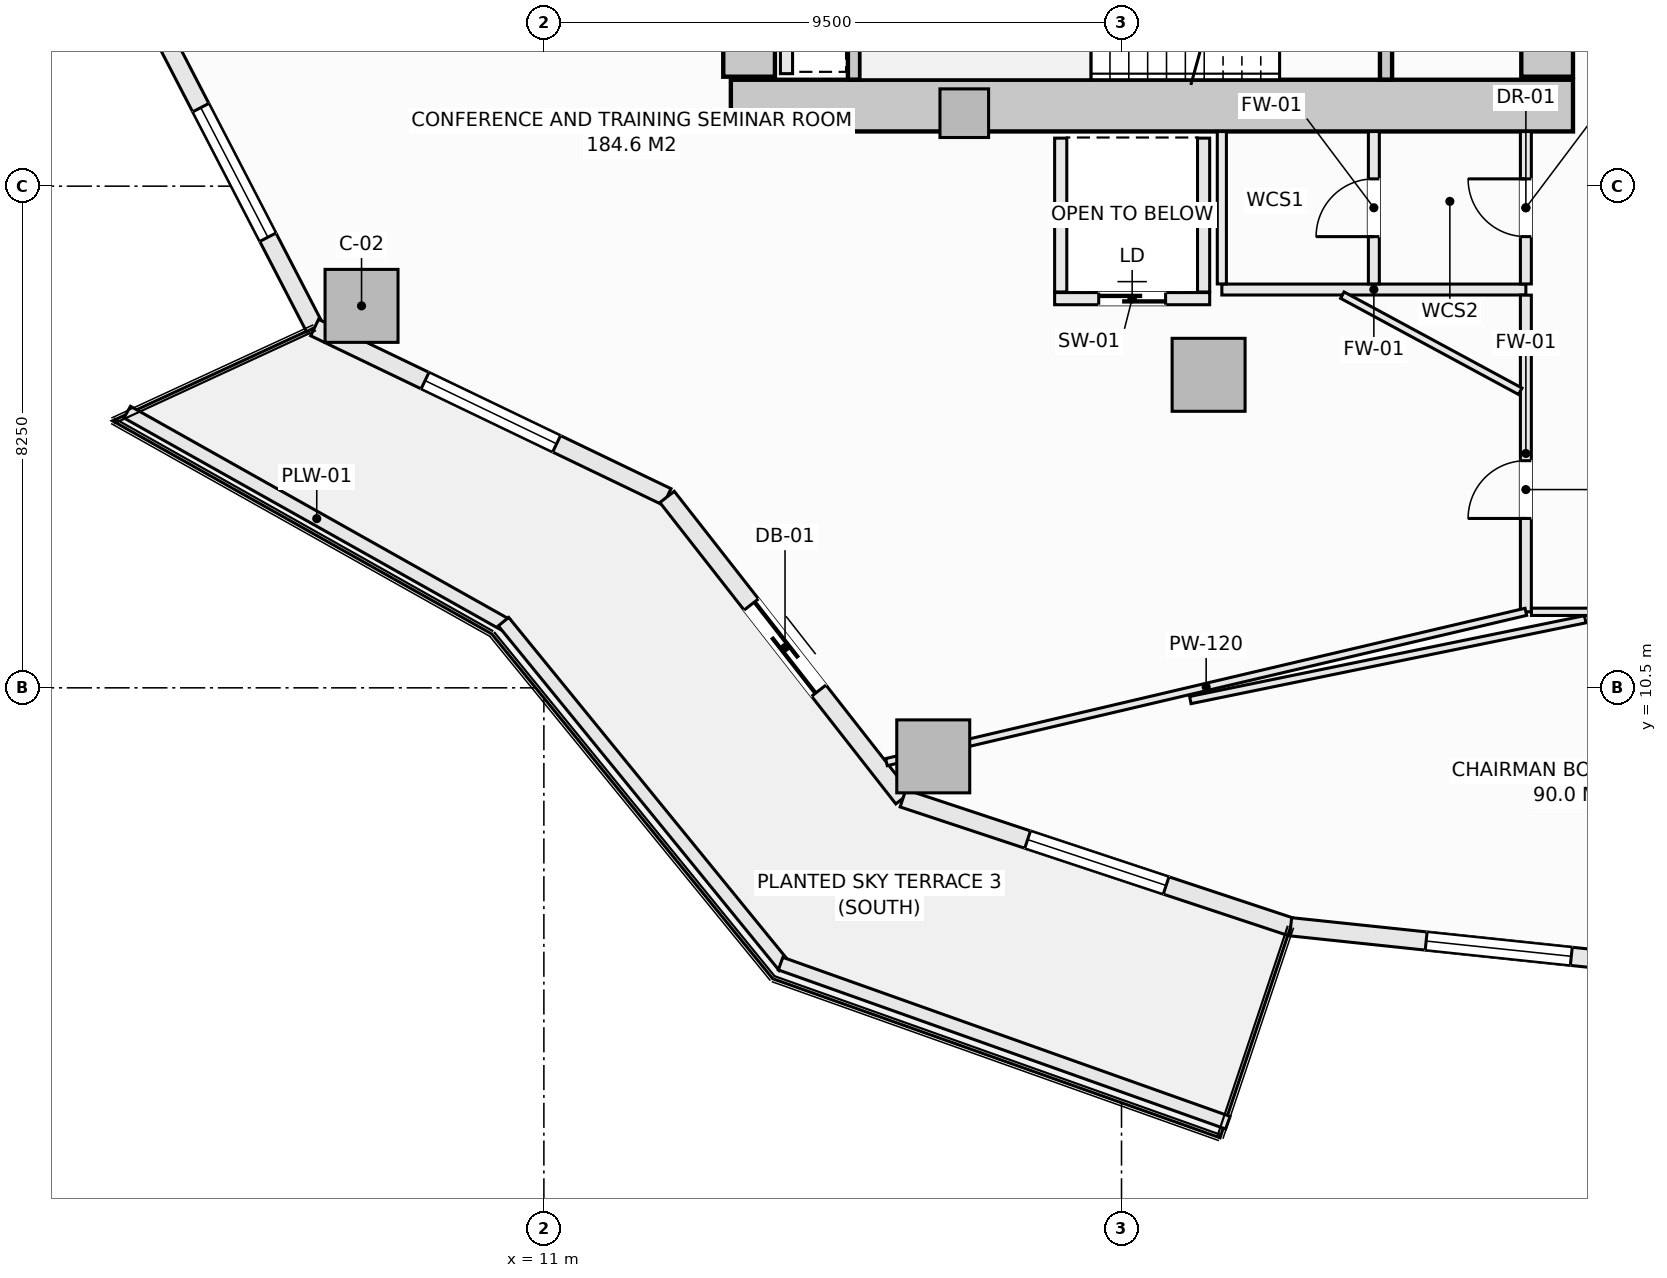
"""IFC4 building model, lengths in metres.
Left out: names, types, materials, properties, quantities, classifications, styles, units other than length and angle.
Written with IfcOpenShell. Run it as: python <this file> out.ifc"""

import sys

from ifc_helpers import new_model, si_unit, direction, frame, frame_2d, origin, origin_2d, place, context, subcontext, project, spatial, rectangle, extrude, element, fill, save


model = new_model("IFC4")
c1 = context("Model", 3, precision=1e-05, world=origin(), true_north=direction((0.0, 1.0)))
c2 = subcontext(c1, "Body", "Model", "MODEL_VIEW")
j1 = project(units=[si_unit("LENGTHUNIT", "METRE"), si_unit("PLANEANGLEUNIT", "RADIAN")], contexts=[c1])
p1 = place(None, origin())
s1 = spatial("IfcSite", under=j1, at=p1, CompositionType="ELEMENT")
p2 = place(p1, origin())
s2 = spatial("IfcBuilding", under=s1, at=p2, CompositionType="ELEMENT")
p3 = place(p2, frame((0.0, 0.0, 88.1)))
s3 = spatial("IfcBuildingStorey", under=s2, at=p3, CompositionType="ELEMENT", Elevation=88.1)
p4 = place(p3, frame((14.075, 20.075, -0.28), z_axis=(0.0, 0.0, 1.0), x_axis=(1.0, 0.0, 0.0)))
e1 = element("IfcWall", 1, at=p4, inside=s3, PredefinedType="SHEAR", context=c2, shape_type="SweptSolid", body=[
    extrude(rectangle(XDim=13.85, YDim=0.85, at=frame_2d((6.925, 0.0))), origin(), (0.0, 0.0, 1.0), 3.85),
])
p5 = place(p3, frame((14.375, 20.55, -0.28), z_axis=(0.0, 0.0, 1.0), x_axis=(0.0, 1.0, 0.0)))
e2 = element("IfcWall", 2, at=p5, inside=s3, PredefinedType="SHEAR", context=c2, shape_type="SweptSolid", body=[
    extrude(rectangle(XDim=12.9, YDim=0.85, at=frame_2d((6.45, 0.0))), origin(), (0.0, 0.0, 1.0), 3.85),
])
p6 = place(p3, frame((27.5, 20.55, -0.28), z_axis=(0.0, 0.0, 1.0), x_axis=(0.0, 1.0, 0.0)))
e3 = element("IfcWall", 3, at=p6, inside=s3, PredefinedType="SHEAR", context=c2, shape_type="SweptSolid", body=[
    extrude(rectangle(XDim=1.5, YDim=0.85, at=frame_2d((0.75, 0.0))), origin(), (0.0, 0.0, 1.0), 3.85),
])
for number, where, z_axis, x_axis in (
    (4, (8.001, 16.781, -0.28), (0.0, 0.0, 1.0), (1.0, 0.0, 0.0)),
    (5, (17.404, 9.373, -0.28), (0.0, 0.0, 1.0), (1.0, 0.0, 0.0)),
    (6, (21.932, 15.648, -0.28), (0.0, 0.0, 1.0), (1.0, 0.0, 0.0)),
):
    element("IfcColumn", number, at=place(p3, frame(where, z_axis=z_axis, x_axis=x_axis)), inside=s3, PredefinedType="COLUMN", context=c2, shape_type="SweptSolid", body=[
        extrude(rectangle(XDim=1.2, YDim=1.2, at=origin_2d()), origin(), (0.0, 0.0, 1.0), 3.85),
    ])
p7 = place(p3, frame((17.914, 19.95, -0.28), z_axis=(0.0, 0.0, 1.0), x_axis=(1.0, 0.0, 0.0)))
e7 = element("IfcColumn", 7, at=p7, inside=s3, PredefinedType="PILASTER", context=c2, shape_type="SweptSolid", body=[
    extrude(rectangle(XDim=0.8, YDim=0.8, at=origin_2d()), origin(), (0.0, 0.0, 1.0), 3.85),
])
p8 = place(p3, frame((4.588, 21.526, 0.0), z_axis=(0.0, 0.0, 1.0), x_axis=(0.459800981414, -0.888021991558, 0.0)))
e8 = element("IfcWall", 8, at=p8, inside=s3, PredefinedType="SOLIDWALL", context=c2, shape_type="SweptSolid", body=[
    extrude(rectangle(XDim=5.744, YDim=0.3, at=frame_2d((2.872, 0.0))), origin(), (0.0, 0.0, 1.0), 3.093),
])
p9 = place(p8, frame((1.672, 0.0, 0.85)))
e9 = element("IfcOpeningElement", 9, at=p9, cuts=e8, PredefinedType="OPENING", context=c2, shape_type="SweptSolid", body=[
    extrude(rectangle(XDim=2.4, YDim=1.9, at=frame_2d((1.2, 0.95))), frame((0.0, 0.16, 0.0), z_axis=(0.0, -1.0, 0.0), x_axis=(1.0, 0.0, 0.0)), (0.0, 0.0, 1.0), 0.32),
])
p10 = place(p3, frame((7.229, 16.425, 0.0), z_axis=(0.0, 0.0, 1.0), x_axis=(0.901354747727, -0.433081538224, 0.0)))
e10 = element("IfcWall", 10, at=p10, inside=s3, PredefinedType="SOLIDWALL", context=c2, shape_type="SweptSolid", body=[
    extrude(rectangle(XDim=6.431, YDim=0.3, at=frame_2d((3.215, 0.0))), origin(), (0.0, 0.0, 1.0), 3.093),
])
p11 = place(p10, frame((2.015, 0.0, 0.85)))
e11 = element("IfcOpeningElement", 11, at=p11, cuts=e10, PredefinedType="OPENING", context=c2, shape_type="SweptSolid", body=[
    extrude(rectangle(XDim=2.4, YDim=1.9, at=frame_2d((1.2, 0.95))), frame((0.0, 0.16, 0.0), z_axis=(0.0, -1.0, 0.0), x_axis=(1.0, 0.0, 0.0)), (0.0, 0.0, 1.0), 0.32),
])
p12 = place(p3, frame((13.026, 13.64, 0.0), z_axis=(0.0, 0.0, 1.0), x_axis=(0.616434798832, -0.78740595552, 0.0)))
e12 = element("IfcWall", 12, at=p12, inside=s3, PredefinedType="SOLIDWALL", context=c2, shape_type="SweptSolid", body=[
    extrude(rectangle(XDim=6.294, YDim=0.3, at=frame_2d((3.147, 0.0))), origin(), (0.0, 0.0, 1.0), 3.093),
])
p13 = place(p12, frame((2.247, 0.0, 0.0)))
e13 = element("IfcOpeningElement", 13, at=p13, cuts=e12, PredefinedType="OPENING", context=c2, shape_type="SweptSolid", body=[
    extrude(rectangle(XDim=1.8, YDim=2.25, at=frame_2d((0.9, 1.125))), frame((0.0, 0.16, 0.0), z_axis=(0.0, -1.0, 0.0), x_axis=(1.0, 0.0, 0.0)), (0.0, 0.0, 1.0), 0.32),
])
p14 = place(p3, frame((16.906, 8.684, 0.0), z_axis=(0.0, 0.0, 1.0), x_axis=(0.949245153629, -0.314537181127, 0.0)))
e14 = element("IfcWall", 14, at=p14, inside=s3, PredefinedType="SOLIDWALL", context=c2, shape_type="SweptSolid", body=[
    extrude(rectangle(XDim=6.717, YDim=0.3, at=frame_2d((3.358, 0.0))), origin(), (0.0, 0.0, 1.0), 3.093),
])
p15 = place(p14, frame((2.159, 0.0, 0.85)))
e15 = element("IfcOpeningElement", 15, at=p15, cuts=e14, PredefinedType="OPENING", context=c2, shape_type="SweptSolid", body=[
    extrude(rectangle(XDim=2.4, YDim=1.9, at=frame_2d((1.2, 0.95))), frame((0.0, 0.16, 0.0), z_axis=(0.0, -1.0, 0.0), x_axis=(1.0, 0.0, 0.0)), (0.0, 0.0, 1.0), 0.32),
])
p16 = place(p3, frame((23.282, 6.571, 0.0), z_axis=(0.0, 0.0, 1.0), x_axis=(0.994498840295, -0.104747585419, 0.0)))
e16 = element("IfcWall", 16, at=p16, inside=s3, PredefinedType="SOLIDWALL", context=c2, shape_type="SweptSolid", body=[
    extrude(rectangle(XDim=6.88, YDim=0.3, at=frame_2d((3.44, 0.0))), origin(), (0.0, 0.0, 1.0), 3.093),
])
p17 = place(p16, frame((2.24, 0.0, 0.85)))
e17 = element("IfcOpeningElement", 17, at=p17, cuts=e16, PredefinedType="OPENING", context=c2, shape_type="SweptSolid", body=[
    extrude(rectangle(XDim=2.4, YDim=1.9, at=frame_2d((1.2, 0.95))), frame((0.0, 0.16, 0.0), z_axis=(0.0, -1.0, 0.0), x_axis=(1.0, 0.0, 0.0)), (0.0, 0.0, 1.0), 0.32),
])
p18 = place(p3, frame((4.147, 15.034, 0.0), z_axis=(0.0, 0.0, 1.0), x_axis=(0.871775109335, -0.489906275468, 0.0)))
e18 = element("IfcWall", 18, at=p18, inside=s3, PredefinedType="PARAPET", context=c2, shape_type="SweptSolid", body=[
    extrude(rectangle(XDim=7.152, YDim=0.22, at=frame_2d((3.576, 0.0))), origin(), (0.0, 0.0, 1.0), 0.52),
])
p19 = place(p3, frame((10.336, 11.589, 0.0), z_axis=(0.0, 0.0, 1.0), x_axis=(0.631819273026, -0.775115737315, 0.0)))
e19 = element("IfcWall", 19, at=p19, inside=s3, PredefinedType="PARAPET", context=c2, shape_type="SweptSolid", body=[
    extrude(rectangle(XDim=7.316, YDim=0.22, at=frame_2d((3.658, 0.0))), origin(), (0.0, 0.0, 1.0), 0.52),
])
p20 = place(p3, frame((14.893, 5.965, 0.0), z_axis=(0.0, 0.0, 1.0), x_axis=(0.942203722205, -0.335040513764, 0.0)))
e20 = element("IfcWall", 20, at=p20, inside=s3, PredefinedType="PARAPET", context=c2, shape_type="SweptSolid", body=[
    extrude(rectangle(XDim=7.807, YDim=0.22, at=frame_2d((3.904, 0.0))), origin(), (0.0, 0.0, 1.0), 0.52),
])
p21 = place(p3, frame((24.85, 20.502, -0.28), z_axis=(0.0, 0.0, 1.0), x_axis=(0.0, 1.0, 0.0)))
e21 = element("IfcWall", 21, at=p21, inside=s3, PredefinedType="SHEAR", context=c2, shape_type="SweptSolid", body=[
    extrude(rectangle(XDim=3.038, YDim=0.2, at=frame_2d((1.519, 0.0))), origin(), (0.0, 0.0, 1.0), 3.85),
])
p22 = place(p21, frame((0.969, 0.0, 0.28)))
e22 = element("IfcOpeningElement", 22, at=p22, cuts=e21, PredefinedType="OPENING", context=c2, shape_type="SweptSolid", body=[
    extrude(rectangle(XDim=1.1, YDim=2.15, at=frame_2d((0.55, 1.075))), frame((0.0, 0.11, 0.0), z_axis=(0.0, -1.0, 0.0), x_axis=(1.0, 0.0, 0.0)), (0.0, 0.0, 1.0), 0.22),
])
p23 = place(p3, frame((16.1, 20.502, -0.28), z_axis=(0.0, 0.0, 1.0), x_axis=(0.0, 1.0, 0.0)))
e23 = element("IfcWall", 23, at=p23, inside=s3, PredefinedType="SHEAR", context=c2, shape_type="SweptSolid", body=[
    extrude(rectangle(XDim=3.036, YDim=0.2, at=frame_2d((1.518, 0.0))), origin(), (0.0, 0.0, 1.0), 3.85),
])
p24 = place(p3, frame((19.4, 16.9, 0.0), z_axis=(0.0, 0.0, 1.0), x_axis=(1.0, 0.0, 0.0)))
e24 = element("IfcWall", 24, at=p24, inside=s3, PredefinedType="SOLIDWALL", context=c2, shape_type="SweptSolid", body=[
    extrude(rectangle(XDim=2.55, YDim=0.2, at=frame_2d((1.275, 0.0))), origin(), (0.0, 0.0, 1.0), 3.57),
])
p25 = place(p24, frame((0.725, 0.0, 0.0)))
e25 = element("IfcOpeningElement", 25, at=p25, cuts=e24, PredefinedType="OPENING", context=c2, shape_type="SweptSolid", body=[
    extrude(rectangle(XDim=1.1, YDim=2.2, at=frame_2d((0.55, 1.1))), frame((0.0, 0.11, 0.0), z_axis=(0.0, -1.0, 0.0), x_axis=(1.0, 0.0, 0.0)), (0.0, 0.0, 1.0), 0.22),
])
for number, where, z_axis, x_axis in (
    (26, (19.5, 17.01, 0.0), (0.0, 0.0, 1.0), (0.0, 1.0, 0.0)),
    (27, (21.85, 17.01, 0.0), (0.0, 0.0, 1.0), (0.0, 1.0, 0.0)),
):
    element("IfcWall", number, at=place(p3, frame(where, z_axis=z_axis, x_axis=x_axis)), inside=s3, PredefinedType="SOLIDWALL", context=c2, shape_type="SweptSolid", body=[
        extrude(rectangle(XDim=2.53, YDim=0.2, at=frame_2d((1.265, 0.0))), origin(), (0.0, 0.0, 1.0), 3.57),
    ])
p26 = place(p3, frame((14.99, 20.6, 0.0), z_axis=(0.0, 0.0, 1.0), x_axis=(0.0, 1.0, 0.0)))
e28 = element("IfcWall", 28, at=p26, inside=s3, PredefinedType="SOLIDWALL", context=c2, shape_type="SweptSolid", body=[
    extrude(rectangle(XDim=2.85, YDim=0.2, at=frame_2d((1.425, 0.0))), origin(), (0.0, 0.0, 1.0), 3.57),
])
p27 = place(p3, frame((22.15, 17.05, 0.0), z_axis=(0.0, 0.0, 1.0), x_axis=(1.0, 0.0, 0.0)))
e29 = element("IfcWall", 29, at=p27, inside=s3, PredefinedType="SOLIDWALL", context=c2, shape_type="SweptSolid", body=[
    extrude(rectangle(XDim=5.0, YDim=0.18, at=frame_2d((2.5, 0.0))), origin(), (0.0, 0.0, 1.0), 3.57),
])
p28 = place(p3, frame((22.15, 17.142, 0.0), z_axis=(0.0, 0.0, 1.0), x_axis=(0.0, 1.0, 0.0)))
e30 = element("IfcWall", 30, at=p28, inside=s3, PredefinedType="PARTITIONING", context=c2, shape_type="SweptSolid", body=[
    extrude(rectangle(XDim=2.506, YDim=0.15, at=frame_2d((1.253, 0.0))), origin(), (0.0, 0.0, 1.0), 3.57),
])
p29 = place(p3, frame((24.65, 17.142, 0.0), z_axis=(0.0, 0.0, 1.0), x_axis=(0.0, 1.0, 0.0)))
e31 = element("IfcWall", 31, at=p29, inside=s3, PredefinedType="SOLIDWALL", context=c2, shape_type="SweptSolid", body=[
    extrude(rectangle(XDim=2.506, YDim=0.18, at=frame_2d((1.253, 0.0))), origin(), (0.0, 0.0, 1.0), 3.57),
])
p30 = place(p29, frame((0.778, 0.0, 0.0)))
e32 = element("IfcOpeningElement", 32, at=p30, cuts=e31, PredefinedType="OPENING", context=c2, shape_type="SweptSolid", body=[
    extrude(rectangle(XDim=0.95, YDim=2.1, at=frame_2d((0.475, 1.05))), frame((0.0, 0.1, 0.0), z_axis=(0.0, -1.0, 0.0), x_axis=(1.0, 0.0, 0.0)), (0.0, 0.0, 1.0), 0.2),
])
p31 = place(p3, frame((27.15, 11.75, 0.0), z_axis=(0.0, 0.0, 1.0), x_axis=(0.0, 1.0, 0.0)))
e33 = element("IfcWall", 33, at=p31, inside=s3, PredefinedType="SOLIDWALL", context=c2, shape_type="SweptSolid", body=[
    extrude(rectangle(XDim=5.208, YDim=0.18, at=frame_2d((2.604, 0.0))), origin(), (0.0, 0.0, 1.0), 3.57),
])
p32 = place(p31, frame((1.535, 0.0, 0.0)))
e34 = element("IfcOpeningElement", 34, at=p32, cuts=e33, PredefinedType="OPENING", context=c2, shape_type="SweptSolid", body=[
    extrude(rectangle(XDim=0.95, YDim=2.1, at=frame_2d((0.475, 1.05))), frame((0.0, 0.1, 0.0), z_axis=(0.0, -1.0, 0.0), x_axis=(1.0, 0.0, 0.0)), (0.0, 0.0, 1.0), 0.2),
])
p33 = place(p3, frame((27.15, 17.142, 0.0), z_axis=(0.0, 0.0, 1.0), x_axis=(0.0, 1.0, 0.0)))
e35 = element("IfcWall", 35, at=p33, inside=s3, PredefinedType="SOLIDWALL", context=c2, shape_type="SweptSolid", body=[
    extrude(rectangle(XDim=2.506, YDim=0.18, at=frame_2d((1.253, 0.0))), origin(), (0.0, 0.0, 1.0), 3.57),
])
p34 = place(p33, frame((0.778, 0.0, 0.0)))
e36 = element("IfcOpeningElement", 36, at=p34, cuts=e35, PredefinedType="OPENING", context=c2, shape_type="SweptSolid", body=[
    extrude(rectangle(XDim=0.95, YDim=2.1, at=frame_2d((0.475, 1.05))), frame((0.0, 0.1, 0.0), z_axis=(0.0, -1.0, 0.0), x_axis=(1.0, 0.0, 0.0)), (0.0, 0.0, 1.0), 0.2),
])
p35 = place(p3, frame((27.242, 11.75, 0.0), z_axis=(0.0, 0.0, 1.0), x_axis=(1.0, 0.0, 0.0)))
e37 = element("IfcWall", 37, at=p35, inside=s3, PredefinedType="PARTITIONING", context=c2, shape_type="SweptSolid", body=[
    extrude(rectangle(XDim=8.646, YDim=0.12, at=frame_2d((4.323, 0.0))), origin(), (0.0, 0.0, 1.0), 3.57),
])
p36 = place(p35, frame((3.186, 0.0, 0.0)))
e38 = element("IfcOpeningElement", 38, at=p36, cuts=e37, PredefinedType="OPENING", context=c2, shape_type="SweptSolid", body=[
    extrude(rectangle(XDim=0.95, YDim=2.1, at=frame_2d((0.475, 1.05))), frame((0.0, 0.07, 0.0), z_axis=(0.0, -1.0, 0.0), x_axis=(1.0, 0.0, 0.0)), (0.0, 0.0, 1.0), 0.14),
])
p37 = place(p3, frame((24.132, 16.958, 0.0), z_axis=(0.0, 0.0, 1.0), x_axis=(0.879874093471, -0.475206880882, 0.0)))
e39 = element("IfcWall", 39, at=p37, inside=s3, PredefinedType="PARTITIONING", context=c2, shape_type="SweptSolid", body=[
    extrude(rectangle(XDim=3.326, YDim=0.12, at=frame_2d((1.663, 0.0))), origin(), (0.0, 0.0, 1.0), 3.57),
])
p38 = place(p3, frame((16.634, 9.278, 0.0), z_axis=(0.0, 0.0, 1.0), x_axis=(0.973467827541, 0.228823925195, 0.0)))
e40 = element("IfcWall", 40, at=p38, inside=s3, PredefinedType="PARTITIONING", context=c2, shape_type="SweptSolid", body=[
    extrude(rectangle(XDim=10.803, YDim=0.12, at=frame_2d((5.401, 0.0))), origin(), (0.0, 0.0, 1.0), 3.093),
])
p39 = place(p3, frame((21.632, 10.299, 0.0), z_axis=(0.0, 0.0, 1.0), x_axis=(0.979686821634, 0.200533616924, 0.0)))
e41 = element("IfcWall", 41, at=p39, inside=s3, PredefinedType="PARTITIONING", context=c2, shape_type="SweptSolid", body=[
    extrude(rectangle(XDim=6.629, YDim=0.12, at=frame_2d((3.314, 0.0))), origin(), (0.0, 0.0, 1.0), 3.57),
])
p40 = place(p9, origin())
e42 = element("IfcWindow", 42, at=p40, inside=s3, PartitioningType="SINGLE_PANEL", PredefinedType="WINDOW", context=c2, shape_type="SweptSolid", body=[
    extrude(rectangle(XDim=2.4, YDim=1.9, at=frame_2d((1.2, 0.95))), frame((0.0, 0.03, 0.0), z_axis=(0.0, -1.0, 0.0), x_axis=(1.0, 0.0, 0.0)), (0.0, 0.0, 1.0), 0.06),
])
fill(e9, e42)
p41 = place(p11, origin())
e43 = element("IfcWindow", 43, at=p41, inside=s3, PartitioningType="SINGLE_PANEL", PredefinedType="WINDOW", context=c2, shape_type="SweptSolid", body=[
    extrude(rectangle(XDim=2.4, YDim=1.9, at=frame_2d((1.2, 0.95))), frame((0.0, 0.03, 0.0), z_axis=(0.0, -1.0, 0.0), x_axis=(1.0, 0.0, 0.0)), (0.0, 0.0, 1.0), 0.06),
])
fill(e11, e43)
p42 = place(p13, frame((1.8, 0.0, 0.0), z_axis=(0.0, 0.0, 1.0), x_axis=(-1.0, 0.0, 0.0)))
e44 = element("IfcDoor", 44, at=p42, inside=s3, OperationType="SLIDING_TO_LEFT", PredefinedType="DOOR", context=c2, shape_type="SweptSolid", body=[
    extrude(rectangle(XDim=1.8, YDim=2.25, at=frame_2d((0.9, 1.125))), frame((0.0, 0.025, 0.0), z_axis=(0.0, -1.0, 0.0), x_axis=(1.0, 0.0, 0.0)), (0.0, 0.0, 1.0), 0.05),
])
fill(e13, e44)
p43 = place(p15, origin())
e45 = element("IfcWindow", 45, at=p43, inside=s3, PartitioningType="SINGLE_PANEL", PredefinedType="WINDOW", context=c2, shape_type="SweptSolid", body=[
    extrude(rectangle(XDim=2.4, YDim=1.9, at=frame_2d((1.2, 0.95))), frame((0.0, 0.03, 0.0), z_axis=(0.0, -1.0, 0.0), x_axis=(1.0, 0.0, 0.0)), (0.0, 0.0, 1.0), 0.06),
])
fill(e15, e45)
p44 = place(p17, origin())
e46 = element("IfcWindow", 46, at=p44, inside=s3, PartitioningType="SINGLE_PANEL", PredefinedType="WINDOW", context=c2, shape_type="SweptSolid", body=[
    extrude(rectangle(XDim=2.4, YDim=1.9, at=frame_2d((1.2, 0.95))), frame((0.0, 0.03, 0.0), z_axis=(0.0, -1.0, 0.0), x_axis=(1.0, 0.0, 0.0)), (0.0, 0.0, 1.0), 0.06),
])
fill(e17, e46)
p45 = place(p25, origin())
e47 = element("IfcDoor", 47, at=p45, inside=s3, OperationType="SLIDING_TO_LEFT", PredefinedType="DOOR", context=c2, shape_type="SweptSolid", body=[
    extrude(rectangle(XDim=1.1, YDim=2.2, at=frame_2d((0.55, 1.1))), frame((0.0, 0.025, 0.0), z_axis=(0.0, -1.0, 0.0), x_axis=(1.0, 0.0, 0.0)), (0.0, 0.0, 1.0), 0.05),
])
fill(e25, e47)
p46 = place(p34, origin())
e48 = element("IfcDoor", 48, at=p46, inside=s3, OperationType="SINGLE_SWING_RIGHT", PredefinedType="DOOR", context=c2, shape_type="SweptSolid", body=[
    extrude(rectangle(XDim=0.95, YDim=2.1, at=frame_2d((0.475, 1.05))), frame((0.0, 0.025, 0.0), z_axis=(0.0, -1.0, 0.0), x_axis=(1.0, 0.0, 0.0)), (0.0, 0.0, 1.0), 0.05),
])
fill(e36, e48)
p47 = place(p32, origin())
e49 = element("IfcDoor", 49, at=p47, inside=s3, OperationType="SINGLE_SWING_LEFT", PredefinedType="DOOR", context=c2, shape_type="SweptSolid", body=[
    extrude(rectangle(XDim=0.95, YDim=2.1, at=frame_2d((0.475, 1.05))), frame((0.0, 0.025, 0.0), z_axis=(0.0, -1.0, 0.0), x_axis=(1.0, 0.0, 0.0)), (0.0, 0.0, 1.0), 0.05),
])
fill(e34, e49)
p48 = place(p30, origin())
e50 = element("IfcDoor", 50, at=p48, inside=s3, OperationType="SINGLE_SWING_LEFT", PredefinedType="DOOR", context=c2, shape_type="SweptSolid", body=[
    extrude(rectangle(XDim=0.95, YDim=2.1, at=frame_2d((0.475, 1.05))), frame((0.0, 0.025, 0.0), z_axis=(0.0, -1.0, 0.0), x_axis=(1.0, 0.0, 0.0)), (0.0, 0.0, 1.0), 0.05),
])
fill(e32, e50)
save(model, sys.argv[1])
